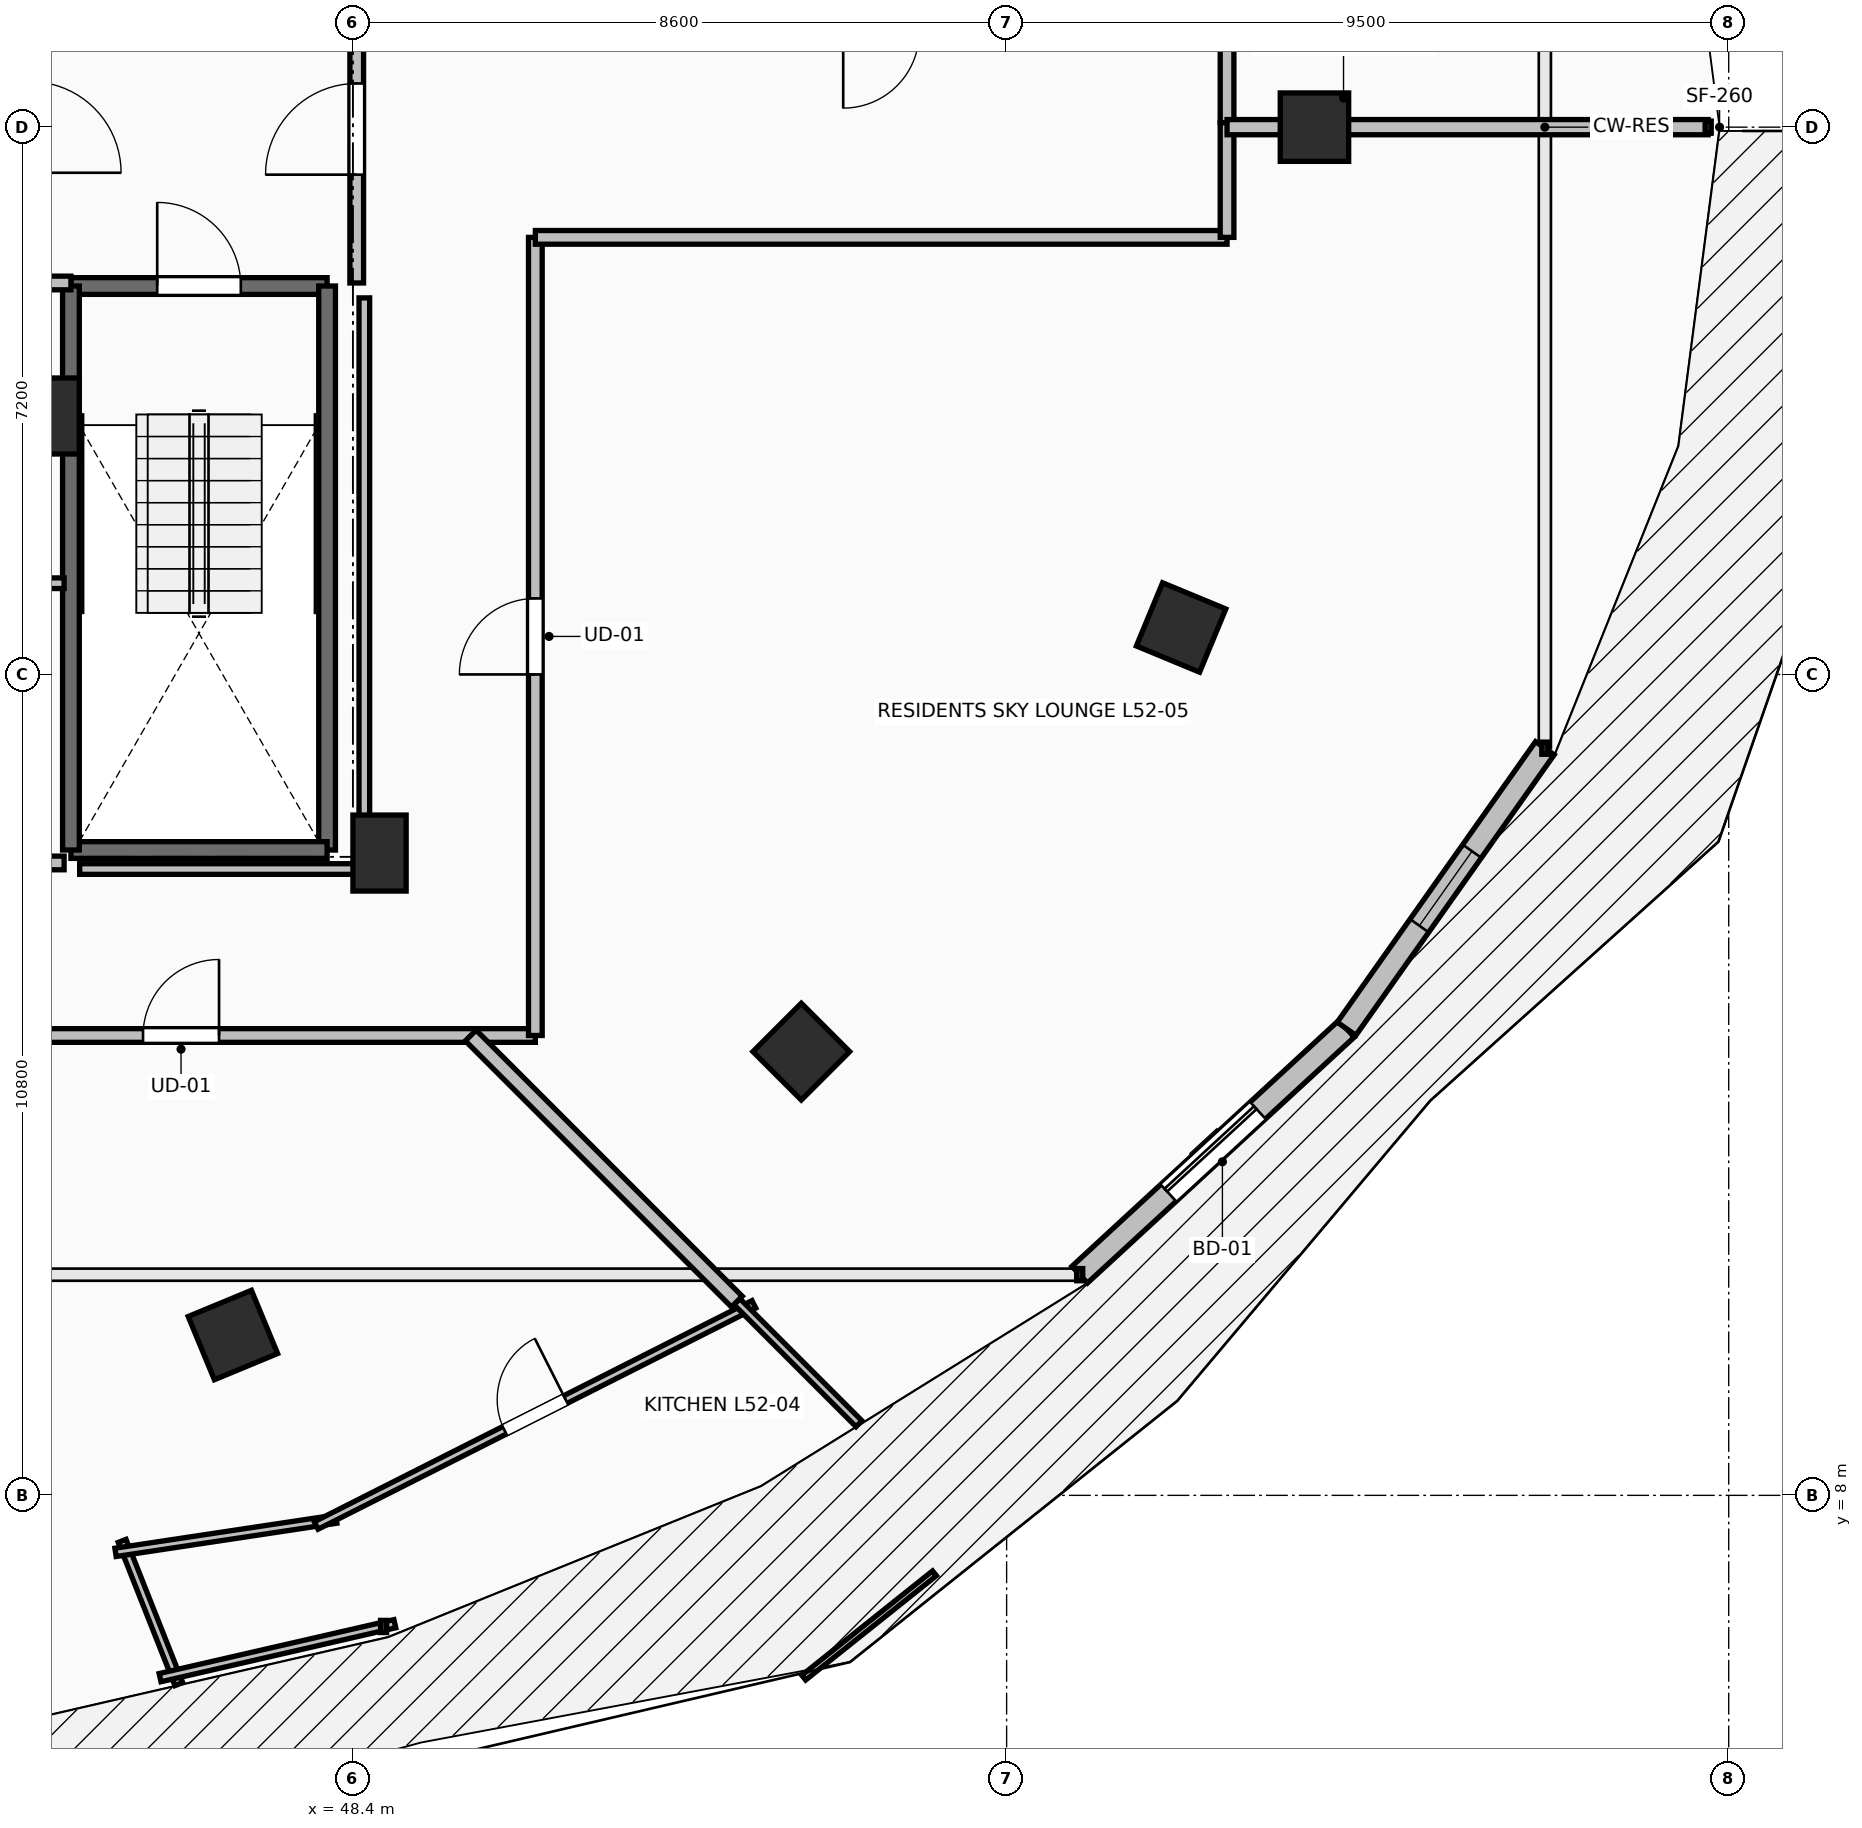
"""IFC4 building model, lengths in metres.
Left out: names, types, materials, properties, quantities, classifications, styles, units other than length and angle.
Written with IfcOpenShell. Run it as: python <this file> out.ifc"""

import sys

from ifc_helpers import new_model, si_unit, direction, frame, frame_2d, origin, origin_2d, place, context, subcontext, project, spatial, rectangle, extrude, element, fill, save


model = new_model("IFC4")
c1 = context("Model", 3, precision=1e-05, world=origin(), true_north=direction((0.0, 1.0)))
c2 = subcontext(c1, "Body", "Model", "MODEL_VIEW")
j1 = project(units=[si_unit("LENGTHUNIT", "METRE"), si_unit("PLANEANGLEUNIT", "RADIAN")], contexts=[c1])
p1 = place(None, origin())
s1 = spatial("IfcSite", under=j1, at=p1, CompositionType="ELEMENT")
p2 = place(p1, origin())
s2 = spatial("IfcBuilding", under=s1, at=p2, CompositionType="ELEMENT")
p3 = place(p2, frame((0.0, 0.0, 193.1)))
s3 = spatial("IfcBuildingStorey", under=s2, at=p3, CompositionType="ELEMENT", Elevation=193.1)
for number, where, z_axis, x_axis in (
    (1, (61.05, 26.0, 0.0), (0.0, 0.0, 1.0), (1.0, 0.0, 0.0)),
    (2, (46.821, 10.109, 0.0), (0.0, 0.0, 1.0), (0.383, -0.924, 0.0)),
    (3, (54.299, 13.838, 0.0), (0.0, 0.0, 1.0), (0.707, -0.707, 0.0)),
    (4, (59.295, 19.418, 0.0), (0.0, 0.0, 1.0), (0.924, -0.383, 0.0)),
):
    element("IfcColumn", number, at=place(p3, frame(where, z_axis=z_axis, x_axis=x_axis)), inside=s3, PredefinedType="COLUMN", context=c2, shape_type="SweptSolid", body=[
        extrude(rectangle(XDim=0.9, YDim=0.9, at=origin_2d()), origin(), (0.0, 0.0, 1.0), 3.5),
    ])
for number, where, z_axis, x_axis in (
    (5, (48.75, 16.45, 0.0), (0.0, 0.0, 1.0), (1.0, 0.0, 0.0)),
    (6, (44.45, 22.2, 0.0), (0.0, 0.0, 1.0), (1.0, 0.0, 0.0)),
):
    element("IfcColumn", number, at=place(p3, frame(where, z_axis=z_axis, x_axis=x_axis)), inside=s3, PredefinedType="PILASTER", context=c2, shape_type="SweptSolid", body=[
        extrude(rectangle(XDim=0.7, YDim=1.0, at=origin_2d()), origin(), (0.0, 0.0, 1.0), 3.5),
    ])
p4 = place(p3, frame((57.962, 10.903, 0.0), z_axis=(0.0, 0.0, 1.0), x_axis=(0.735359993374, 0.677676678177, 0.0)))
e7 = element("IfcWall", 7, at=p4, inside=s3, PredefinedType="STANDARD", context=c2, shape_type="SweptSolid", body=[
    extrude(rectangle(XDim=4.774, YDim=0.3, at=frame_2d((2.387, 0.0))), origin(), (0.0, 0.0, 1.0), 3.24),
])
p5 = place(p4, frame((1.587, 0.0, 0.0)))
e8 = element("IfcOpeningElement", 8, at=p5, cuts=e7, PredefinedType="OPENING", context=c2, shape_type="SweptSolid", body=[
    extrude(rectangle(XDim=1.6, YDim=2.3, at=frame_2d((0.8, 1.15))), frame((0.0, 0.165, 0.0), z_axis=(0.0, -1.0, 0.0), x_axis=(1.0, 0.0, 0.0)), (0.0, 0.0, 1.0), 0.33),
])
p6 = place(p3, frame((61.472, 14.139, 0.0), z_axis=(0.0, 0.0, 1.0), x_axis=(0.577168747264, 0.81662490605, 0.0)))
e9 = element("IfcWall", 9, at=p6, inside=s3, PredefinedType="STANDARD", context=c2, shape_type="SweptSolid", body=[
    extrude(rectangle(XDim=4.52, YDim=0.3, at=frame_2d((2.26, 0.0))), origin(), (0.0, 0.0, 1.0), 3.24),
])
p7 = place(p6, frame((1.66, 0.0, 0.85)))
e10 = element("IfcOpeningElement", 10, at=p7, cuts=e9, PredefinedType="OPENING", context=c2, shape_type="SweptSolid", body=[
    extrude(rectangle(XDim=1.2, YDim=2.1, at=frame_2d((0.6, 1.05))), frame((0.0, 0.165, 0.0), z_axis=(0.0, -1.0, 0.0), x_axis=(1.0, 0.0, 0.0)), (0.0, 0.0, 1.0), 0.33),
])
p8 = place(p3, frame((44.69, 23.91, 0.0), z_axis=(0.0, 0.0, 1.0), x_axis=(1.0, 0.0, 0.0)))
e11 = element("IfcWall", 11, at=p8, inside=s3, PredefinedType="SOLIDWALL", context=c2, shape_type="SweptSolid", body=[
    extrude(rectangle(XDim=3.37, YDim=0.22, at=frame_2d((1.685, 0.0))), origin(), (0.0, 0.0, 1.0), 3.24),
])
p9 = place(p8, frame((1.135, 0.0, 0.0)))
e12 = element("IfcOpeningElement", 12, at=p9, cuts=e11, PredefinedType="OPENING", context=c2, shape_type="SweptSolid", body=[
    extrude(rectangle(XDim=1.1, YDim=2.15, at=frame_2d((0.55, 1.075))), frame((0.0, 0.125, 0.0), z_axis=(0.0, -1.0, 0.0), x_axis=(1.0, 0.0, 0.0)), (0.0, 0.0, 1.0), 0.25),
])
p10 = place(p3, frame((48.06, 23.91, 0.0), z_axis=(0.0, 0.0, 1.0), x_axis=(0.0, -1.0, 0.0)))
e13 = element("IfcWall", 13, at=p10, inside=s3, PredefinedType="SOLIDWALL", context=c2, shape_type="SweptSolid", body=[
    extrude(rectangle(XDim=7.42, YDim=0.22, at=frame_2d((3.71, 0.0))), origin(), (0.0, 0.0, 1.0), 3.24),
])
p11 = place(p3, frame((48.06, 16.49, 0.0), z_axis=(0.0, 0.0, 1.0), x_axis=(-1.0, 0.0, 0.0)))
e14 = element("IfcWall", 14, at=p11, inside=s3, PredefinedType="SOLIDWALL", context=c2, shape_type="SweptSolid", body=[
    extrude(rectangle(XDim=3.37, YDim=0.22, at=frame_2d((1.685, 0.0))), origin(), (0.0, 0.0, 1.0), 3.24),
])
p12 = place(p3, frame((44.69, 16.49, 0.0), z_axis=(0.0, 0.0, 1.0), x_axis=(0.0, 1.0, 0.0)))
e15 = element("IfcWall", 15, at=p12, inside=s3, PredefinedType="SOLIDWALL", context=c2, shape_type="SweptSolid", body=[
    extrude(rectangle(XDim=7.42, YDim=0.22, at=frame_2d((3.71, 0.0))), origin(), (0.0, 0.0, 1.0), 3.24),
])
p13 = place(p3, frame((44.15, 23.95, 0.0), z_axis=(0.0, 0.0, 1.0), x_axis=(1.0, 0.0, 0.0)))
e16 = element("IfcWall", 16, at=p13, inside=s3, PredefinedType="PARTITIONING", context=c2, shape_type="SweptSolid", body=[
    extrude(rectangle(XDim=0.54, YDim=0.18, at=frame_2d((0.27, 0.0))), origin(), (0.0, 0.0, 1.0), 3.24),
])
p14 = place(p3, frame((48.45, 23.95, 0.0), z_axis=(0.0, 0.0, 1.0), x_axis=(0.0, 1.0, 0.0)))
e17 = element("IfcWall", 17, at=p14, inside=s3, PredefinedType="PARTITIONING", context=c2, shape_type="SweptSolid", body=[
    extrude(rectangle(XDim=4.05, YDim=0.18, at=frame_2d((2.025, 0.0))), origin(), (0.0, 0.0, 1.0), 3.24),
])
p15 = place(p14, frame((1.425, 0.0, 0.0)))
e18 = element("IfcOpeningElement", 18, at=p15, cuts=e17, PredefinedType="OPENING", context=c2, shape_type="SweptSolid", body=[
    extrude(rectangle(XDim=1.2, YDim=2.15, at=frame_2d((0.6, 1.075))), frame((0.0, 0.105, 0.0), z_axis=(0.0, -1.0, 0.0), x_axis=(1.0, 0.0, 0.0)), (0.0, 0.0, 1.0), 0.21),
])
p16 = place(p3, frame((44.6, 20.0, 0.0), z_axis=(0.0, 0.0, 1.0), x_axis=(-1.0, 0.0, 0.0)))
e19 = element("IfcWall", 19, at=p16, inside=s3, PredefinedType="PARTITIONING", context=c2, shape_type="SweptSolid", body=[
    extrude(rectangle(XDim=3.2, YDim=0.14, at=frame_2d((1.6, 0.0))), origin(), (0.0, 0.0, 1.0), 3.24),
])
p17 = place(p3, frame((41.4, 16.32, 0.0), z_axis=(0.0, 0.0, 1.0), x_axis=(1.0, 0.0, 0.0)))
e20 = element("IfcWall", 20, at=p17, inside=s3, PredefinedType="PARTITIONING", context=c2, shape_type="SweptSolid", body=[
    extrude(rectangle(XDim=3.2, YDim=0.18, at=frame_2d((1.6, 0.0))), origin(), (0.0, 0.0, 1.0), 3.24),
])
p18 = place(p17, frame((1.2, 0.0, 0.0)))
e21 = element("IfcOpeningElement", 21, at=p18, cuts=e20, PredefinedType="OPENING", context=c2, shape_type="SweptSolid", body=[
    extrude(rectangle(XDim=0.8, YDim=2.05, at=frame_2d((0.4, 1.025))), frame((0.0, 0.105, 0.0), z_axis=(0.0, -1.0, 0.0), x_axis=(1.0, 0.0, 0.0)), (0.0, 0.0, 1.0), 0.21),
])
p19 = place(p3, frame((42.242, 14.05, 0.0), z_axis=(0.0, 0.0, 1.0), x_axis=(1.0, 0.0, 0.0)))
e22 = element("IfcWall", 22, at=p19, inside=s3, PredefinedType="PARTITIONING", context=c2, shape_type="SweptSolid", body=[
    extrude(rectangle(XDim=7.793, YDim=0.18, at=frame_2d((3.896, 0.0))), origin(), (0.0, 0.0, 1.0), 2.432),
])
p20 = place(p19, frame((3.396, 0.0, 0.0)))
e23 = element("IfcOpeningElement", 23, at=p20, cuts=e22, PredefinedType="OPENING", context=c2, shape_type="SweptSolid", body=[
    extrude(rectangle(XDim=1.0, YDim=2.15, at=frame_2d((0.5, 1.075))), frame((0.0, 0.105, 0.0), z_axis=(0.0, -1.0, 0.0), x_axis=(1.0, 0.0, 0.0)), (0.0, 0.0, 1.0), 0.21),
])
p21 = place(p3, frame((50.035, 14.05, 0.0), z_axis=(0.0, 0.0, 1.0), x_axis=(1.0, 0.0, 0.0)))
e24 = element("IfcWall", 24, at=p21, inside=s3, PredefinedType="PARTITIONING", context=c2, shape_type="SweptSolid", body=[
    extrude(rectangle(XDim=0.765, YDim=0.18, at=frame_2d((0.383, 0.0))), origin(), (0.0, 0.0, 1.0), 2.922),
])
p22 = place(p3, frame((50.8, 14.05, 0.0), z_axis=(0.0, 0.0, 1.0), x_axis=(0.0, 1.0, 0.0)))
e25 = element("IfcWall", 25, at=p22, inside=s3, PredefinedType="PARTITIONING", context=c2, shape_type="SweptSolid", body=[
    extrude(rectangle(XDim=10.5, YDim=0.18, at=frame_2d((5.25, 0.0))), origin(), (0.0, 0.0, 1.0), 2.432),
])
p23 = place(p22, frame((4.75, 0.0, 0.0)))
e26 = element("IfcOpeningElement", 26, at=p23, cuts=e25, PredefinedType="OPENING", context=c2, shape_type="SweptSolid", body=[
    extrude(rectangle(XDim=1.0, YDim=2.15, at=frame_2d((0.5, 1.075))), frame((0.0, 0.105, 0.0), z_axis=(0.0, -1.0, 0.0), x_axis=(1.0, 0.0, 0.0)), (0.0, 0.0, 1.0), 0.21),
])
p24 = place(p3, frame((50.8, 24.55, 0.0), z_axis=(0.0, 0.0, 1.0), x_axis=(1.0, 0.0, 0.0)))
e27 = element("IfcWall", 27, at=p24, inside=s3, PredefinedType="PARTITIONING", context=c2, shape_type="SweptSolid", body=[
    extrude(rectangle(XDim=9.1, YDim=0.18, at=frame_2d((4.55, 0.0))), origin(), (0.0, 0.0, 1.0), 2.432),
])
p25 = place(p3, frame((59.9, 24.55, 0.0), z_axis=(0.0, 0.0, 1.0), x_axis=(0.0, 1.0, 0.0)))
e28 = element("IfcWall", 28, at=p25, inside=s3, PredefinedType="PARTITIONING", context=c2, shape_type="SweptSolid", body=[
    extrude(rectangle(XDim=1.51, YDim=0.18, at=frame_2d((0.755, 0.0))), origin(), (0.0, 0.0, 1.0), 2.432),
])
p26 = place(p3, frame((59.9, 26.06, 0.0), z_axis=(0.0, 0.0, 1.0), x_axis=(0.0, 1.0, 0.0)))
e29 = element("IfcWall", 29, at=p26, inside=s3, PredefinedType="PARTITIONING", context=c2, shape_type="SweptSolid", body=[
    extrude(rectangle(XDim=1.19, YDim=0.18, at=frame_2d((0.595, 0.0))), origin(), (0.0, 0.0, 1.0), 2.432),
])
p27 = place(p3, frame((46.11, 5.517, 0.0), z_axis=(0.0, 0.0, 1.0), x_axis=(-0.368148258243, 0.929767099844, 0.0)))
e30 = element("IfcWall", 30, at=p27, inside=s3, PredefinedType="PARTITIONING", context=c2, shape_type="SweptSolid", body=[
    extrude(rectangle(XDim=2.027, YDim=0.11, at=frame_2d((1.013, 0.0))), origin(), (0.0, 0.0, 1.0), 3.24),
])
p28 = place(p3, frame((45.277, 7.25, 0.0), z_axis=(0.0, 0.0, 1.0), x_axis=(0.988815285508, 0.149145335648, 0.0)))
e31 = element("IfcWall", 31, at=p28, inside=s3, PredefinedType="PARTITIONING", context=c2, shape_type="SweptSolid", body=[
    extrude(rectangle(XDim=2.937, YDim=0.11, at=frame_2d((1.468, 0.0))), origin(), (0.0, 0.0, 1.0), 3.24),
])
p29 = place(p3, frame((47.917, 7.604, 0.0), z_axis=(0.0, 0.0, 1.0), x_axis=(0.892549884102, 0.450948671569, 0.0)))
e32 = element("IfcWall", 32, at=p29, inside=s3, PredefinedType="PARTITIONING", context=c2, shape_type="SweptSolid", body=[
    extrude(rectangle(XDim=6.451, YDim=0.11, at=frame_2d((3.226, 0.0))), origin(), (0.0, 0.0, 1.0), 3.24),
])
p30 = place(p29, frame((2.776, 0.0, 0.0)))
e33 = element("IfcOpeningElement", 33, at=p30, cuts=e32, PredefinedType="OPENING", context=c2, shape_type="SweptSolid", body=[
    extrude(rectangle(XDim=0.9, YDim=2.1, at=frame_2d((0.45, 1.05))), frame((0.0, 0.07, 0.0), z_axis=(0.0, -1.0, 0.0), x_axis=(1.0, 0.0, 0.0)), (0.0, 0.0, 1.0), 0.14),
])
p31 = place(p3, frame((53.451, 10.549, 0.0), z_axis=(0.0, 0.0, 1.0), x_axis=(0.707106781187, -0.707106781187, 0.0)))
e34 = element("IfcWall", 34, at=p31, inside=s3, PredefinedType="PARTITIONING", context=c2, shape_type="SweptSolid", body=[
    extrude(rectangle(XDim=2.273, YDim=0.11, at=frame_2d((1.136, 0.0))), origin(), (0.0, 0.0, 1.0), 3.24),
])
p32 = place(p3, frame((45.863, 5.602, 0.0), z_axis=(0.0, 0.0, 1.0), x_axis=(0.974621780148, 0.223857958671, 0.0)))
e35 = element("IfcWall", 35, at=p32, inside=s3, PredefinedType="PARTITIONING", context=c2, shape_type="SweptSolid", body=[
    extrude(rectangle(XDim=3.169, YDim=0.11, at=frame_2d((1.584, 0.0))), origin(), (0.0, 0.0, 1.0), 3.24),
])
p33 = place(p3, frame((53.451, 10.549, 0.0), z_axis=(0.0, 0.0, 1.0), x_axis=(-0.707106781187, 0.707106781187, 0.0)))
e36 = element("IfcWall", 36, at=p33, inside=s3, PredefinedType="PARTITIONING", context=c2, shape_type="SweptSolid", body=[
    extrude(rectangle(XDim=4.951, YDim=0.2, at=frame_2d((2.476, 0.0))), origin(), (0.0, 0.0, 1.0), 2.774),
])
p34 = place(p3, frame((66.229, 26.0, 0.0), z_axis=(0.0, 0.0, 1.0), x_axis=(-1.0, 0.0, 0.0)))
e37 = element("IfcWall", 37, at=p34, inside=s3, PredefinedType="PARTITIONING", context=c2, shape_type="SweptSolid", body=[
    extrude(rectangle(XDim=6.329, YDim=0.2, at=frame_2d((3.165, 0.0))), origin(), (0.0, 0.0, 1.0), 2.432),
])
p35 = place(p3, frame((48.55, 16.24, 0.0), z_axis=(0.0, 0.0, 1.0), x_axis=(0.0, 1.0, 0.0)))
e38 = element("IfcWall", 38, at=p35, inside=s3, PredefinedType="PARTITIONING", context=c2, shape_type="SweptSolid", body=[
    extrude(rectangle(XDim=7.514, YDim=0.14, at=frame_2d((3.757, 0.0))), origin(), (0.0, 0.0, 1.0), 2.432),
])
p36 = place(p3, frame((44.805, 16.24, 0.0), z_axis=(0.0, 0.0, 1.0), x_axis=(1.0, 0.0, 0.0)))
e39 = element("IfcWall", 39, at=p36, inside=s3, PredefinedType="PARTITIONING", context=c2, shape_type="SweptSolid", body=[
    extrude(rectangle(XDim=3.745, YDim=0.14, at=frame_2d((1.873, 0.0))), origin(), (0.0, 0.0, 1.0), 2.432),
])
p37 = place(p5, origin())
e40 = element("IfcDoor", 40, at=p37, inside=s3, OperationType="SLIDING_TO_LEFT", PredefinedType="DOOR", context=c2, shape_type="SweptSolid", body=[
    extrude(rectangle(XDim=1.6, YDim=2.3, at=frame_2d((0.8, 1.15))), frame((0.0, 0.025, 0.0), z_axis=(0.0, -1.0, 0.0), x_axis=(1.0, 0.0, 0.0)), (0.0, 0.0, 1.0), 0.05),
])
fill(e8, e40)
p38 = place(p7, origin())
e41 = element("IfcWindow", 41, at=p38, inside=s3, PartitioningType="SINGLE_PANEL", PredefinedType="WINDOW", context=c2, shape_type="SweptSolid", body=[
    extrude(rectangle(XDim=1.2, YDim=2.1, at=frame_2d((0.6, 1.05))), frame((0.0, 0.03, 0.0), z_axis=(0.0, -1.0, 0.0), x_axis=(1.0, 0.0, 0.0)), (0.0, 0.0, 1.0), 0.06),
])
fill(e10, e41)
p39 = place(p9, origin())
e42 = element("IfcDoor", 42, at=p39, inside=s3, OperationType="SINGLE_SWING_LEFT", PredefinedType="DOOR", context=c2, shape_type="SweptSolid", body=[
    extrude(rectangle(XDim=1.1, YDim=2.15, at=frame_2d((0.55, 1.075))), frame((0.0, 0.025, 0.0), z_axis=(0.0, -1.0, 0.0), x_axis=(1.0, 0.0, 0.0)), (0.0, 0.0, 1.0), 0.05),
])
fill(e12, e42)
p40 = place(p15, origin())
e43 = element("IfcDoor", 43, at=p40, inside=s3, OperationType="SINGLE_SWING_LEFT", PredefinedType="DOOR", context=c2, shape_type="SweptSolid", body=[
    extrude(rectangle(XDim=1.2, YDim=2.15, at=frame_2d((0.6, 1.075))), frame((0.0, 0.025, 0.0), z_axis=(0.0, -1.0, 0.0), x_axis=(1.0, 0.0, 0.0)), (0.0, 0.0, 1.0), 0.05),
])
fill(e18, e43)
p41 = place(p20, origin())
e44 = element("IfcDoor", 44, at=p41, inside=s3, OperationType="SINGLE_SWING_RIGHT", PredefinedType="DOOR", context=c2, shape_type="SweptSolid", body=[
    extrude(rectangle(XDim=1.0, YDim=2.15, at=frame_2d((0.5, 1.075))), frame((0.0, 0.025, 0.0), z_axis=(0.0, -1.0, 0.0), x_axis=(1.0, 0.0, 0.0)), (0.0, 0.0, 1.0), 0.05),
])
fill(e23, e44)
p42 = place(p23, origin())
e45 = element("IfcDoor", 45, at=p42, inside=s3, OperationType="SINGLE_SWING_LEFT", PredefinedType="DOOR", context=c2, shape_type="SweptSolid", body=[
    extrude(rectangle(XDim=1.0, YDim=2.15, at=frame_2d((0.5, 1.075))), frame((0.0, 0.025, 0.0), z_axis=(0.0, -1.0, 0.0), x_axis=(1.0, 0.0, 0.0)), (0.0, 0.0, 1.0), 0.05),
])
fill(e26, e45)
p43 = place(p30, origin())
e46 = element("IfcDoor", 46, at=p43, inside=s3, OperationType="SINGLE_SWING_RIGHT", PredefinedType="DOOR", context=c2, shape_type="SweptSolid", body=[
    extrude(rectangle(XDim=0.9, YDim=2.1, at=frame_2d((0.45, 1.05))), frame((0.0, 0.025, 0.0), z_axis=(0.0, -1.0, 0.0), x_axis=(1.0, 0.0, 0.0)), (0.0, 0.0, 1.0), 0.05),
])
fill(e33, e46)
save(model, sys.argv[1])
